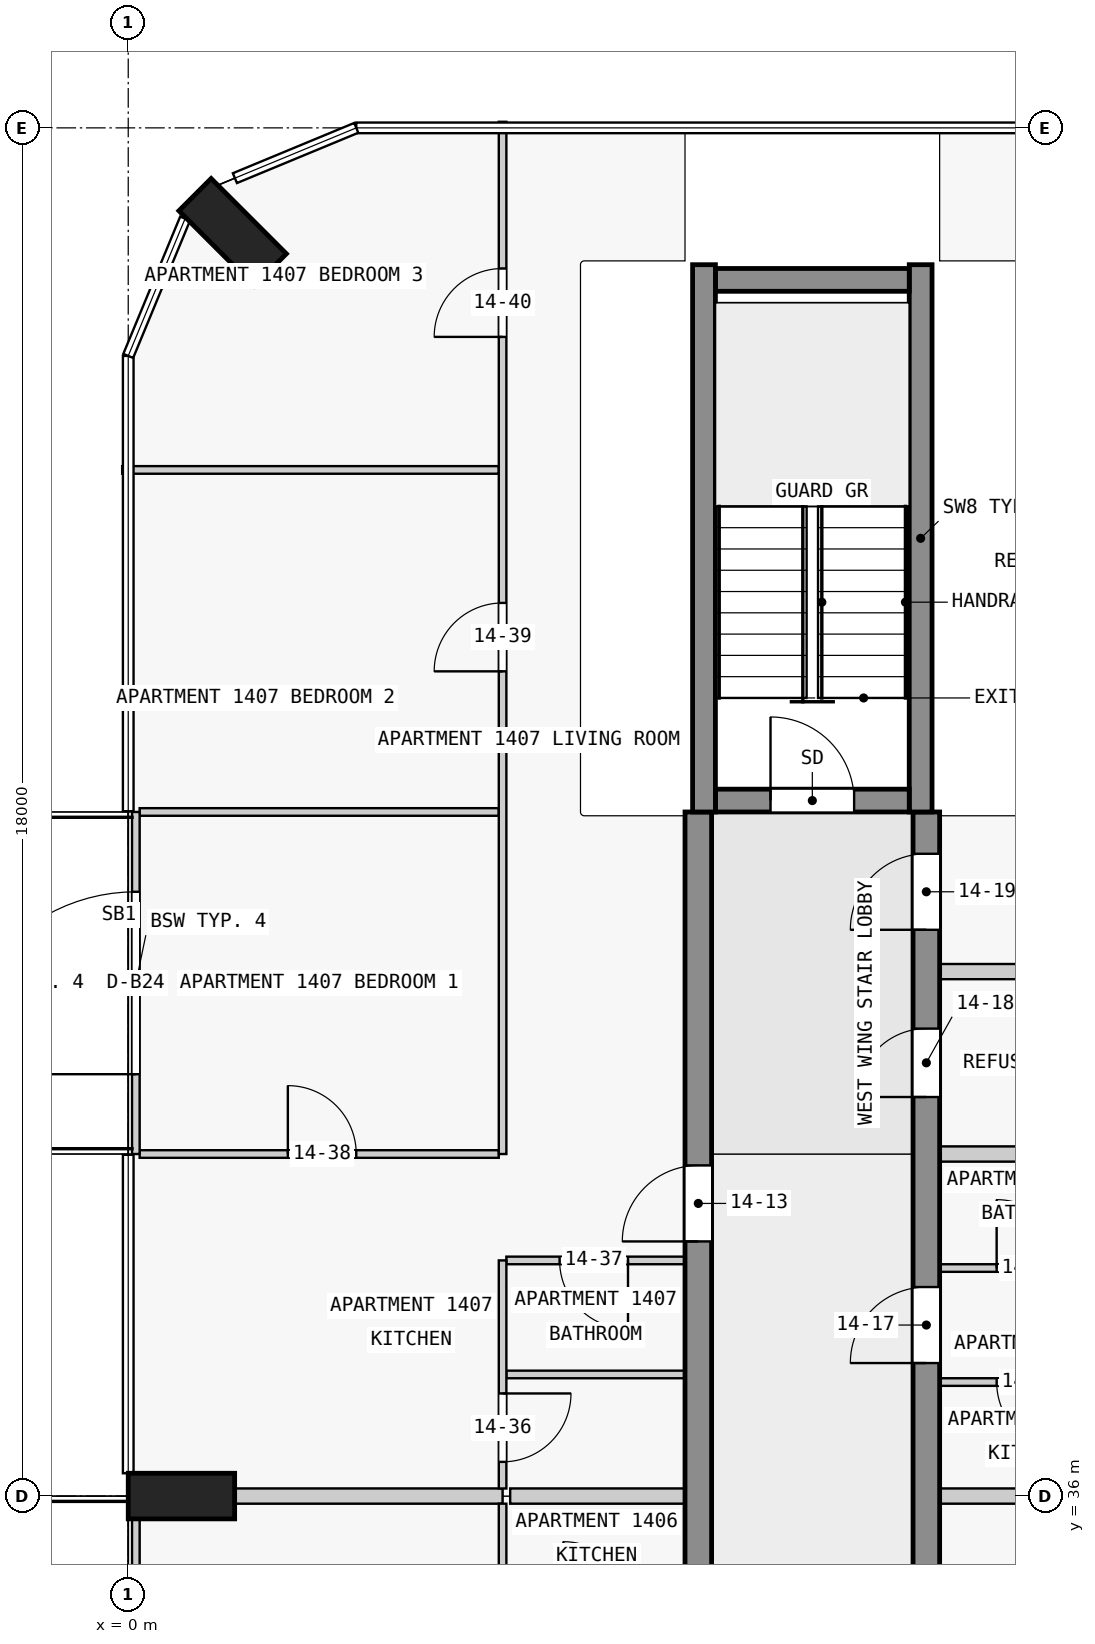
"""IFC4 building model, lengths in metres.
Left out: names, types, materials, properties, quantities, classifications, styles, units other than length and angle.
Written with IfcOpenShell. Run it as: python <this file> out.ifc"""

import sys

from ifc_helpers import new_model, si_unit, direction, frame, frame_2d, origin, origin_2d, place, context, subcontext, project, spatial, rectangle, extrude, element, fill, save


model = new_model("IFC4")
c1 = context("Model", 3, precision=1e-05, world=origin(), true_north=direction((0.0, 1.0)))
c2 = subcontext(c1, "Body", "Model", "MODEL_VIEW")
j1 = project(units=[si_unit("LENGTHUNIT", "METRE"), si_unit("PLANEANGLEUNIT", "RADIAN")], contexts=[c1])
p1 = place(None, origin())
s1 = spatial("IfcSite", under=j1, at=p1, CompositionType="ELEMENT")
p2 = place(p1, origin())
s2 = spatial("IfcBuilding", under=s1, at=p2, CompositionType="ELEMENT")
p3 = place(p2, frame((0.0, 0.0, 58.3)))
s3 = spatial("IfcBuildingStorey", under=s2, at=p3, CompositionType="ELEMENT", Elevation=58.3)
for number, where, z_axis, x_axis in (
    (1, (1.374, 52.626, 0.0), (0.0, 0.0, 1.0), (0.707, 0.707, 0.0)),
    (2, (0.7, 36.0, 0.0), (0.0, 0.0, 1.0), (0.0, 1.0, 0.0)),
):
    element("IfcColumn", number, at=place(p3, frame(where, z_axis=z_axis, x_axis=x_axis)), inside=s3, PredefinedType="COLUMN", context=c2, shape_type="SweptSolid", body=[
        extrude(rectangle(XDim=0.6, YDim=1.4, at=origin_2d()), origin(), (0.0, 0.0, 1.0), 3.5),
    ])
p4 = place(p3, frame((7.725, 45.15, 0.0), z_axis=(0.0, 0.0, 1.0), x_axis=(1.0, 0.0, 0.0)))
e3 = element("IfcWall", 3, at=p4, inside=s3, PredefinedType="SHEAR", context=c2, shape_type="SweptSolid", body=[
    extrude(rectangle(XDim=2.55, YDim=0.3, at=frame_2d((1.275, 0.0))), origin(), (0.0, 0.0, 1.0), 3.5),
])
p5 = place(p4, frame((0.725, 0.0, 0.0)))
e4 = element("IfcOpeningElement", 4, at=p5, cuts=e3, PredefinedType="OPENING", context=c2, shape_type="SweptSolid", body=[
    extrude(rectangle(XDim=1.1, YDim=2.1, at=frame_2d((0.55, 1.05))), frame((0.0, 0.16, 0.0), z_axis=(0.0, -1.0, 0.0), x_axis=(1.0, 0.0, 0.0)), (0.0, 0.0, 1.0), 0.32),
])
p6 = place(p3, frame((7.725, 52.0, 0.0), z_axis=(0.0, 0.0, 1.0), x_axis=(1.0, 0.0, 0.0)))
e5 = element("IfcWall", 5, at=p6, inside=s3, PredefinedType="SHEAR", context=c2, shape_type="SweptSolid", body=[
    extrude(rectangle(XDim=2.55, YDim=0.3, at=frame_2d((1.275, 0.0))), origin(), (0.0, 0.0, 1.0), 3.5),
])
for number, where, z_axis, x_axis in (
    (6, (7.575, 45.0, 0.0), (0.0, 0.0, 1.0), (0.0, 1.0, 0.0)),
    (7, (10.425, 45.0, 0.0), (0.0, 0.0, 1.0), (0.0, 1.0, 0.0)),
):
    element("IfcWall", number, at=place(p3, frame(where, z_axis=z_axis, x_axis=x_axis)), inside=s3, PredefinedType="SHEAR", context=c2, shape_type="SweptSolid", body=[
        extrude(rectangle(XDim=7.2, YDim=0.3, at=frame_2d((3.6, 0.0))), origin(), (0.0, 0.0, 1.0), 3.5),
    ])
p7 = place(p3, frame((7.5, 18.0, 0.0), z_axis=(0.0, 0.0, 1.0), x_axis=(0.0, 1.0, 0.0)))
e8 = element("IfcWall", 8, at=p7, inside=s3, PredefinedType="SHEAR", context=c2, shape_type="SweptSolid", body=[
    extrude(rectangle(XDim=27.0, YDim=0.35, at=frame_2d((13.5, 0.0))), origin(), (0.0, 0.0, 1.0), 3.25),
])
p8 = place(p7, frame((1.75, 0.0, 0.0)))
e9 = element("IfcOpeningElement", 9, at=p8, cuts=e8, PredefinedType="OPENING", context=c2, shape_type="SweptSolid", body=[
    extrude(rectangle(XDim=1.0, YDim=2.1, at=frame_2d((0.5, 1.05))), frame((0.0, 0.185, 0.0), z_axis=(0.0, -1.0, 0.0), x_axis=(1.0, 0.0, 0.0)), (0.0, 0.0, 1.0), 0.37),
])
p9 = place(p7, frame((8.55, 0.0, 0.0)))
e10 = element("IfcOpeningElement", 10, at=p9, cuts=e8, PredefinedType="OPENING", context=c2, shape_type="SweptSolid", body=[
    extrude(rectangle(XDim=1.0, YDim=2.1, at=frame_2d((0.5, 1.05))), frame((0.0, 0.185, 0.0), z_axis=(0.0, -1.0, 0.0), x_axis=(1.0, 0.0, 0.0)), (0.0, 0.0, 1.0), 0.37),
])
p10 = place(p7, frame((15.25, 0.0, 0.0)))
e11 = element("IfcOpeningElement", 11, at=p10, cuts=e8, PredefinedType="OPENING", context=c2, shape_type="SweptSolid", body=[
    extrude(rectangle(XDim=1.0, YDim=2.1, at=frame_2d((0.5, 1.05))), frame((0.0, 0.185, 0.0), z_axis=(0.0, -1.0, 0.0), x_axis=(1.0, 0.0, 0.0)), (0.0, 0.0, 1.0), 0.37),
])
p11 = place(p7, frame((21.35, 0.0, 0.0)))
e12 = element("IfcOpeningElement", 12, at=p11, cuts=e8, PredefinedType="OPENING", context=c2, shape_type="SweptSolid", body=[
    extrude(rectangle(XDim=1.0, YDim=2.1, at=frame_2d((0.5, 1.05))), frame((0.0, 0.185, 0.0), z_axis=(0.0, -1.0, 0.0), x_axis=(1.0, 0.0, 0.0)), (0.0, 0.0, 1.0), 0.37),
])
p12 = place(p3, frame((10.5, 18.0, 0.0), z_axis=(0.0, 0.0, 1.0), x_axis=(0.0, 1.0, 0.0)))
e13 = element("IfcWall", 13, at=p12, inside=s3, PredefinedType="SHEAR", context=c2, shape_type="SweptSolid", body=[
    extrude(rectangle(XDim=27.0, YDim=0.35, at=frame_2d((13.5, 0.0))), origin(), (0.0, 0.0, 1.0), 3.25),
])
p13 = place(p12, frame((4.05, 0.0, 0.0)))
e14 = element("IfcOpeningElement", 14, at=p13, cuts=e13, PredefinedType="OPENING", context=c2, shape_type="SweptSolid", body=[
    extrude(rectangle(XDim=1.0, YDim=2.1, at=frame_2d((0.5, 1.05))), frame((0.0, 0.185, 0.0), z_axis=(0.0, -1.0, 0.0), x_axis=(1.0, 0.0, 0.0)), (0.0, 0.0, 1.0), 0.37),
])
p14 = place(p12, frame((10.75, 0.0, 0.0)))
e15 = element("IfcOpeningElement", 15, at=p14, cuts=e13, PredefinedType="OPENING", context=c2, shape_type="SweptSolid", body=[
    extrude(rectangle(XDim=1.0, YDim=2.1, at=frame_2d((0.5, 1.05))), frame((0.0, 0.185, 0.0), z_axis=(0.0, -1.0, 0.0), x_axis=(1.0, 0.0, 0.0)), (0.0, 0.0, 1.0), 0.37),
])
p15 = place(p12, frame((15.25, 0.0, 0.0)))
e16 = element("IfcOpeningElement", 16, at=p15, cuts=e13, PredefinedType="OPENING", context=c2, shape_type="SweptSolid", body=[
    extrude(rectangle(XDim=1.0, YDim=2.1, at=frame_2d((0.5, 1.05))), frame((0.0, 0.185, 0.0), z_axis=(0.0, -1.0, 0.0), x_axis=(1.0, 0.0, 0.0)), (0.0, 0.0, 1.0), 0.37),
])
p16 = place(p12, frame((19.75, 0.0, 0.0)))
e17 = element("IfcOpeningElement", 17, at=p16, cuts=e13, PredefinedType="OPENING", context=c2, shape_type="SweptSolid", body=[
    extrude(rectangle(XDim=1.0, YDim=2.1, at=frame_2d((0.5, 1.05))), frame((0.0, 0.185, 0.0), z_axis=(0.0, -1.0, 0.0), x_axis=(1.0, 0.0, 0.0)), (0.0, 0.0, 1.0), 0.37),
])
p17 = place(p12, frame((23.25, 0.0, 0.0)))
e18 = element("IfcOpeningElement", 18, at=p17, cuts=e13, PredefinedType="OPENING", context=c2, shape_type="SweptSolid", body=[
    extrude(rectangle(XDim=0.9, YDim=2.1, at=frame_2d((0.45, 1.05))), frame((0.0, 0.185, 0.0), z_axis=(0.0, -1.0, 0.0), x_axis=(1.0, 0.0, 0.0)), (0.0, 0.0, 1.0), 0.37),
])
p18 = place(p12, frame((25.45, 0.0, 0.0)))
e19 = element("IfcOpeningElement", 19, at=p18, cuts=e13, PredefinedType="OPENING", context=c2, shape_type="SweptSolid", body=[
    extrude(rectangle(XDim=1.0, YDim=2.1, at=frame_2d((0.5, 1.05))), frame((0.0, 0.185, 0.0), z_axis=(0.0, -1.0, 0.0), x_axis=(1.0, 0.0, 0.0)), (0.0, 0.0, 1.0), 0.37),
])
p19 = place(p3, frame((0.1, 31.5, 0.0), z_axis=(0.0, 0.0, 1.0), x_axis=(0.0, 1.0, 0.0)))
e20 = element("IfcWall", 20, at=p19, inside=s3, PredefinedType="STANDARD", context=c2, shape_type="SweptSolid", body=[
    extrude(rectangle(XDim=4.5, YDim=0.1, at=frame_2d((2.25, 0.0))), origin(), (0.0, 0.0, 1.0), 3.25),
])
p20 = place(p19, frame((1.05, 0.0, 0.0)))
e21 = element("IfcOpeningElement", 21, at=p20, cuts=e20, PredefinedType="OPENING", context=c2, shape_type="SweptSolid", body=[
    extrude(rectangle(XDim=2.4, YDim=2.4, at=frame_2d((1.2, 1.2))), frame((0.0, 0.06, 0.0), z_axis=(0.0, -1.0, 0.0), x_axis=(1.0, 0.0, 0.0)), (0.0, 0.0, 1.0), 0.12),
])
p21 = place(p3, frame((0.1, 40.5, 0.0), z_axis=(0.0, 0.0, 1.0), x_axis=(0.0, 1.0, 0.0)))
e22 = element("IfcWall", 22, at=p21, inside=s3, PredefinedType="STANDARD", context=c2, shape_type="SweptSolid", body=[
    extrude(rectangle(XDim=4.5, YDim=0.1, at=frame_2d((2.25, 0.0))), origin(), (0.0, 0.0, 1.0), 3.25),
])
p22 = place(p21, frame((1.05, 0.0, 0.0)))
e23 = element("IfcOpeningElement", 23, at=p22, cuts=e22, PredefinedType="OPENING", context=c2, shape_type="SweptSolid", body=[
    extrude(rectangle(XDim=2.4, YDim=2.4, at=frame_2d((1.2, 1.2))), frame((0.0, 0.06, 0.0), z_axis=(0.0, -1.0, 0.0), x_axis=(1.0, 0.0, 0.0)), (0.0, 0.0, 1.0), 0.12),
])
p23 = place(p3, frame((7.325, 36.0, 0.0), z_axis=(0.0, 0.0, 1.0), x_axis=(-1.0, 0.0, 0.0)))
e24 = element("IfcWall", 24, at=p23, inside=s3, PredefinedType="PARTITIONING", context=c2, shape_type="SweptSolid", body=[
    extrude(rectangle(XDim=2.3, YDim=0.2, at=frame_2d((1.15, 0.0))), origin(), (0.0, 0.0, 1.0), 3.25),
])
p24 = place(p3, frame((16.6, 36.0, 0.0), z_axis=(0.0, 0.0, 1.0), x_axis=(-1.0, 0.0, 0.0)))
e25 = element("IfcWall", 25, at=p24, inside=s3, PredefinedType="PARTITIONING", context=c2, shape_type="SweptSolid", body=[
    extrude(rectangle(XDim=5.925, YDim=0.2, at=frame_2d((2.962, 0.0))), origin(), (0.0, 0.0, 1.0), 3.25),
])
p25 = place(p3, frame((1.4, 36.0, 0.0), z_axis=(0.0, 0.0, 1.0), x_axis=(1.0, 0.0, 0.0)))
e26 = element("IfcWall", 26, at=p25, inside=s3, PredefinedType="PARTITIONING", context=c2, shape_type="SweptSolid", body=[
    extrude(rectangle(XDim=3.525, YDim=0.2, at=frame_2d((1.763, 0.0))), origin(), (0.0, 0.0, 1.0), 3.25),
])
p26 = place(p3, frame((13.075, 37.5, 0.0), z_axis=(0.0, 0.0, 1.0), x_axis=(-1.0, 0.0, 0.0)))
e27 = element("IfcWall", 27, at=p26, inside=s3, PredefinedType="PARTITIONING", context=c2, shape_type="SweptSolid", body=[
    extrude(rectangle(XDim=2.4, YDim=0.1, at=frame_2d((1.2, 0.0))), origin(), (0.0, 0.0, 1.0), 3.25),
])
p27 = place(p26, frame((0.75, 0.0, 0.0)))
e28 = element("IfcOpeningElement", 28, at=p27, cuts=e27, PredefinedType="OPENING", context=c2, shape_type="SweptSolid", body=[
    extrude(rectangle(XDim=0.9, YDim=2.1, at=frame_2d((0.45, 1.05))), frame((0.0, 0.06, 0.0), z_axis=(0.0, -1.0, 0.0), x_axis=(1.0, 0.0, 0.0)), (0.0, 0.0, 1.0), 0.12),
])
p28 = place(p3, frame((7.325, 37.6, 0.0), z_axis=(0.0, 0.0, 1.0), x_axis=(-1.0, 0.0, 0.0)))
e29 = element("IfcWall", 29, at=p28, inside=s3, PredefinedType="PARTITIONING", context=c2, shape_type="SweptSolid", body=[
    extrude(rectangle(XDim=2.35, YDim=0.1, at=frame_2d((1.175, 0.0))), origin(), (0.0, 0.0, 1.0), 3.25),
])
p29 = place(p3, frame((10.675, 39.0, 0.0), z_axis=(0.0, 0.0, 1.0), x_axis=(1.0, 0.0, 0.0)))
e30 = element("IfcWall", 30, at=p29, inside=s3, PredefinedType="PARTITIONING", context=c2, shape_type="SweptSolid", body=[
    extrude(rectangle(XDim=2.4, YDim=0.1, at=frame_2d((1.2, 0.0))), origin(), (0.0, 0.0, 1.0), 3.25),
])
p30 = place(p29, frame((0.75, 0.0, 0.0)))
e31 = element("IfcOpeningElement", 31, at=p30, cuts=e30, PredefinedType="OPENING", context=c2, shape_type="SweptSolid", body=[
    extrude(rectangle(XDim=0.9, YDim=2.1, at=frame_2d((0.45, 1.05))), frame((0.0, 0.06, 0.0), z_axis=(0.0, -1.0, 0.0), x_axis=(1.0, 0.0, 0.0)), (0.0, 0.0, 1.0), 0.12),
])
p31 = place(p3, frame((7.325, 39.1, 0.0), z_axis=(0.0, 0.0, 1.0), x_axis=(-1.0, 0.0, 0.0)))
e32 = element("IfcWall", 32, at=p31, inside=s3, PredefinedType="PARTITIONING", context=c2, shape_type="SweptSolid", body=[
    extrude(rectangle(XDim=2.35, YDim=0.1, at=frame_2d((1.175, 0.0))), origin(), (0.0, 0.0, 1.0), 3.25),
])
p32 = place(p31, frame((0.75, 0.0, 0.0)))
e33 = element("IfcOpeningElement", 33, at=p32, cuts=e32, PredefinedType="OPENING", context=c2, shape_type="SweptSolid", body=[
    extrude(rectangle(XDim=0.9, YDim=2.1, at=frame_2d((0.45, 1.05))), frame((0.0, 0.06, 0.0), z_axis=(0.0, -1.0, 0.0), x_axis=(1.0, 0.0, 0.0)), (0.0, 0.0, 1.0), 0.12),
])
p33 = place(p3, frame((0.15, 40.5, 0.0), z_axis=(0.0, 0.0, 1.0), x_axis=(1.0, 0.0, 0.0)))
e34 = element("IfcWall", 34, at=p33, inside=s3, PredefinedType="PARTITIONING", context=c2, shape_type="SweptSolid", body=[
    extrude(rectangle(XDim=4.725, YDim=0.1, at=frame_2d((2.363, 0.0))), origin(), (0.0, 0.0, 1.0), 3.25),
])
p34 = place(p33, frame((1.95, 0.0, 0.0)))
e35 = element("IfcOpeningElement", 35, at=p34, cuts=e34, PredefinedType="OPENING", context=c2, shape_type="SweptSolid", body=[
    extrude(rectangle(XDim=0.9, YDim=2.1, at=frame_2d((0.45, 1.05))), frame((0.0, 0.06, 0.0), z_axis=(0.0, -1.0, 0.0), x_axis=(1.0, 0.0, 0.0)), (0.0, 0.0, 1.0), 0.12),
])
p35 = place(p3, frame((12.975, 40.5, 0.0), z_axis=(0.0, 0.0, 1.0), x_axis=(-1.0, 0.0, 0.0)))
e36 = element("IfcWall", 36, at=p35, inside=s3, PredefinedType="PARTITIONING", context=c2, shape_type="SweptSolid", body=[
    extrude(rectangle(XDim=2.3, YDim=0.2, at=frame_2d((1.15, 0.0))), origin(), (0.0, 0.0, 1.0), 3.25),
])
p36 = place(p3, frame((13.075, 42.9, 0.0), z_axis=(0.0, 0.0, 1.0), x_axis=(-1.0, 0.0, 0.0)))
e37 = element("IfcWall", 37, at=p36, inside=s3, PredefinedType="PARTITIONING", context=c2, shape_type="SweptSolid", body=[
    extrude(rectangle(XDim=2.4, YDim=0.2, at=frame_2d((1.2, 0.0))), origin(), (0.0, 0.0, 1.0), 3.25),
])
p37 = place(p3, frame((4.875, 45.0, 0.0), z_axis=(0.0, 0.0, 1.0), x_axis=(-1.0, 0.0, 0.0)))
e38 = element("IfcWall", 38, at=p37, inside=s3, PredefinedType="PARTITIONING", context=c2, shape_type="SweptSolid", body=[
    extrude(rectangle(XDim=4.725, YDim=0.1, at=frame_2d((2.363, 0.0))), origin(), (0.0, 0.0, 1.0), 3.25),
])
p38 = place(p3, frame((4.875, 49.5, 0.0), z_axis=(0.0, 0.0, 1.0), x_axis=(-1.0, 0.0, 0.0)))
e39 = element("IfcWall", 39, at=p38, inside=s3, PredefinedType="PARTITIONING", context=c2, shape_type="SweptSolid", body=[
    extrude(rectangle(XDim=4.955, YDim=0.1, at=frame_2d((2.478, 0.0))), origin(), (0.0, 0.0, 1.0), 3.25),
])
p39 = place(p3, frame((4.925, 35.9, 0.0), z_axis=(0.0, 0.0, 1.0), x_axis=(0.0, -1.0, 0.0)))
e40 = element("IfcWall", 40, at=p39, inside=s3, PredefinedType="PARTITIONING", context=c2, shape_type="SweptSolid", body=[
    extrude(rectangle(XDim=1.4, YDim=0.1, at=frame_2d((0.7, 0.0))), origin(), (0.0, 0.0, 1.0), 3.25),
])
p40 = place(p3, frame((4.925, 39.1, 0.0), z_axis=(0.0, 0.0, 1.0), x_axis=(0.0, -1.0, 0.0)))
e41 = element("IfcWall", 41, at=p40, inside=s3, PredefinedType="PARTITIONING", context=c2, shape_type="SweptSolid", body=[
    extrude(rectangle(XDim=3.0, YDim=0.1, at=frame_2d((1.5, 0.0))), origin(), (0.0, 0.0, 1.0), 3.25),
])
p41 = place(p40, frame((1.75, 0.0, 0.0)))
e42 = element("IfcOpeningElement", 42, at=p41, cuts=e41, PredefinedType="OPENING", context=c2, shape_type="SweptSolid", body=[
    extrude(rectangle(XDim=0.9, YDim=2.1, at=frame_2d((0.45, 1.05))), frame((0.0, 0.06, 0.0), z_axis=(0.0, -1.0, 0.0), x_axis=(1.0, 0.0, 0.0)), (0.0, 0.0, 1.0), 0.12),
])
p42 = place(p3, frame((4.925, 40.5, 0.0), z_axis=(0.0, 0.0, 1.0), x_axis=(0.0, 1.0, 0.0)))
e43 = element("IfcWall", 43, at=p42, inside=s3, PredefinedType="PARTITIONING", context=c2, shape_type="SweptSolid", body=[
    extrude(rectangle(XDim=13.58, YDim=0.1, at=frame_2d((6.79, 0.0))), origin(), (0.0, 0.0, 1.0), 3.25),
])
p43 = place(p42, frame((6.35, 0.0, 0.0)))
e44 = element("IfcOpeningElement", 44, at=p43, cuts=e43, PredefinedType="OPENING", context=c2, shape_type="SweptSolid", body=[
    extrude(rectangle(XDim=0.9, YDim=2.1, at=frame_2d((0.45, 1.05))), frame((0.0, 0.06, 0.0), z_axis=(0.0, -1.0, 0.0), x_axis=(1.0, 0.0, 0.0)), (0.0, 0.0, 1.0), 0.12),
])
p44 = place(p42, frame((10.75, 0.0, 0.0)))
e45 = element("IfcOpeningElement", 45, at=p44, cuts=e43, PredefinedType="OPENING", context=c2, shape_type="SweptSolid", body=[
    extrude(rectangle(XDim=0.9, YDim=2.1, at=frame_2d((0.45, 1.05))), frame((0.0, 0.06, 0.0), z_axis=(0.0, -1.0, 0.0), x_axis=(1.0, 0.0, 0.0)), (0.0, 0.0, 1.0), 0.12),
])
p45 = place(p22, origin())
e46 = element("IfcDoor", 46, at=p45, inside=s3, OperationType="SINGLE_SWING_LEFT", PredefinedType="DOOR", context=c2, shape_type="SweptSolid", body=[
    extrude(rectangle(XDim=2.4, YDim=2.4, at=frame_2d((1.2, 1.2))), frame((0.0, 0.025, 0.0), z_axis=(0.0, -1.0, 0.0), x_axis=(1.0, 0.0, 0.0)), (0.0, 0.0, 1.0), 0.05),
])
fill(e23, e46)
p46 = place(p5, origin())
e47 = element("IfcDoor", 47, at=p46, inside=s3, OperationType="SINGLE_SWING_LEFT", PredefinedType="DOOR", context=c2, shape_type="SweptSolid", body=[
    extrude(rectangle(XDim=1.1, YDim=2.1, at=frame_2d((0.55, 1.05))), frame((0.0, 0.025, 0.0), z_axis=(0.0, -1.0, 0.0), x_axis=(1.0, 0.0, 0.0)), (0.0, 0.0, 1.0), 0.05),
])
fill(e4, e47)
p47 = place(p11, origin())
e48 = element("IfcDoor", 48, at=p47, inside=s3, OperationType="SINGLE_SWING_RIGHT", PredefinedType="DOOR", context=c2, shape_type="SweptSolid", body=[
    extrude(rectangle(XDim=1.0, YDim=2.1, at=frame_2d((0.5, 1.05))), frame((0.0, 0.025, 0.0), z_axis=(0.0, -1.0, 0.0), x_axis=(1.0, 0.0, 0.0)), (0.0, 0.0, 1.0), 0.05),
])
fill(e12, e48)
p48 = place(p16, origin())
e49 = element("IfcDoor", 49, at=p48, inside=s3, OperationType="SINGLE_SWING_RIGHT", PredefinedType="DOOR", context=c2, shape_type="SweptSolid", body=[
    extrude(rectangle(XDim=1.0, YDim=2.1, at=frame_2d((0.5, 1.05))), frame((0.0, 0.025, 0.0), z_axis=(0.0, -1.0, 0.0), x_axis=(1.0, 0.0, 0.0)), (0.0, 0.0, 1.0), 0.05),
])
fill(e17, e49)
p49 = place(p17, origin())
e50 = element("IfcDoor", 50, at=p49, inside=s3, OperationType="SINGLE_SWING_RIGHT", PredefinedType="DOOR", context=c2, shape_type="SweptSolid", body=[
    extrude(rectangle(XDim=0.9, YDim=2.1, at=frame_2d((0.45, 1.05))), frame((0.0, 0.025, 0.0), z_axis=(0.0, -1.0, 0.0), x_axis=(1.0, 0.0, 0.0)), (0.0, 0.0, 1.0), 0.05),
])
fill(e18, e50)
p50 = place(p18, origin())
e51 = element("IfcDoor", 51, at=p50, inside=s3, OperationType="SINGLE_SWING_RIGHT", PredefinedType="DOOR", context=c2, shape_type="SweptSolid", body=[
    extrude(rectangle(XDim=1.0, YDim=2.1, at=frame_2d((0.5, 1.05))), frame((0.0, 0.025, 0.0), z_axis=(0.0, -1.0, 0.0), x_axis=(1.0, 0.0, 0.0)), (0.0, 0.0, 1.0), 0.05),
])
fill(e19, e51)
p51 = place(p41, origin())
e52 = element("IfcDoor", 52, at=p51, inside=s3, OperationType="SINGLE_SWING_RIGHT", PredefinedType="DOOR", context=c2, shape_type="SweptSolid", body=[
    extrude(rectangle(XDim=0.9, YDim=2.1, at=frame_2d((0.45, 1.05))), frame((0.0, 0.025, 0.0), z_axis=(0.0, -1.0, 0.0), x_axis=(1.0, 0.0, 0.0)), (0.0, 0.0, 1.0), 0.05),
])
fill(e42, e52)
p52 = place(p32, origin())
e53 = element("IfcDoor", 53, at=p52, inside=s3, OperationType="SINGLE_SWING_RIGHT", PredefinedType="DOOR", context=c2, shape_type="SweptSolid", body=[
    extrude(rectangle(XDim=0.9, YDim=2.1, at=frame_2d((0.45, 1.05))), frame((0.0, 0.025, 0.0), z_axis=(0.0, -1.0, 0.0), x_axis=(1.0, 0.0, 0.0)), (0.0, 0.0, 1.0), 0.05),
])
fill(e33, e53)
p53 = place(p34, origin())
e54 = element("IfcDoor", 54, at=p53, inside=s3, OperationType="SINGLE_SWING_RIGHT", PredefinedType="DOOR", context=c2, shape_type="SweptSolid", body=[
    extrude(rectangle(XDim=0.9, YDim=2.1, at=frame_2d((0.45, 1.05))), frame((0.0, 0.025, 0.0), z_axis=(0.0, -1.0, 0.0), x_axis=(1.0, 0.0, 0.0)), (0.0, 0.0, 1.0), 0.05),
])
fill(e35, e54)
p54 = place(p43, origin())
e55 = element("IfcDoor", 55, at=p54, inside=s3, OperationType="SINGLE_SWING_RIGHT", PredefinedType="DOOR", context=c2, shape_type="SweptSolid", body=[
    extrude(rectangle(XDim=0.9, YDim=2.1, at=frame_2d((0.45, 1.05))), frame((0.0, 0.025, 0.0), z_axis=(0.0, -1.0, 0.0), x_axis=(1.0, 0.0, 0.0)), (0.0, 0.0, 1.0), 0.05),
])
fill(e44, e55)
p55 = place(p44, origin())
e56 = element("IfcDoor", 56, at=p55, inside=s3, OperationType="SINGLE_SWING_RIGHT", PredefinedType="DOOR", context=c2, shape_type="SweptSolid", body=[
    extrude(rectangle(XDim=0.9, YDim=2.1, at=frame_2d((0.45, 1.05))), frame((0.0, 0.025, 0.0), z_axis=(0.0, -1.0, 0.0), x_axis=(1.0, 0.0, 0.0)), (0.0, 0.0, 1.0), 0.05),
])
fill(e45, e56)
p56 = place(p27, origin())
e57 = element("IfcDoor", 57, at=p56, inside=s3, OperationType="SINGLE_SWING_RIGHT", PredefinedType="DOOR", context=c2, shape_type="SweptSolid", body=[
    extrude(rectangle(XDim=0.9, YDim=2.1, at=frame_2d((0.45, 1.05))), frame((0.0, 0.025, 0.0), z_axis=(0.0, -1.0, 0.0), x_axis=(1.0, 0.0, 0.0)), (0.0, 0.0, 1.0), 0.05),
])
fill(e28, e57)
p57 = place(p30, origin())
e58 = element("IfcDoor", 58, at=p57, inside=s3, OperationType="SINGLE_SWING_RIGHT", PredefinedType="DOOR", context=c2, shape_type="SweptSolid", body=[
    extrude(rectangle(XDim=0.9, YDim=2.1, at=frame_2d((0.45, 1.05))), frame((0.0, 0.025, 0.0), z_axis=(0.0, -1.0, 0.0), x_axis=(1.0, 0.0, 0.0)), (0.0, 0.0, 1.0), 0.05),
])
fill(e31, e58)
save(model, sys.argv[1])
